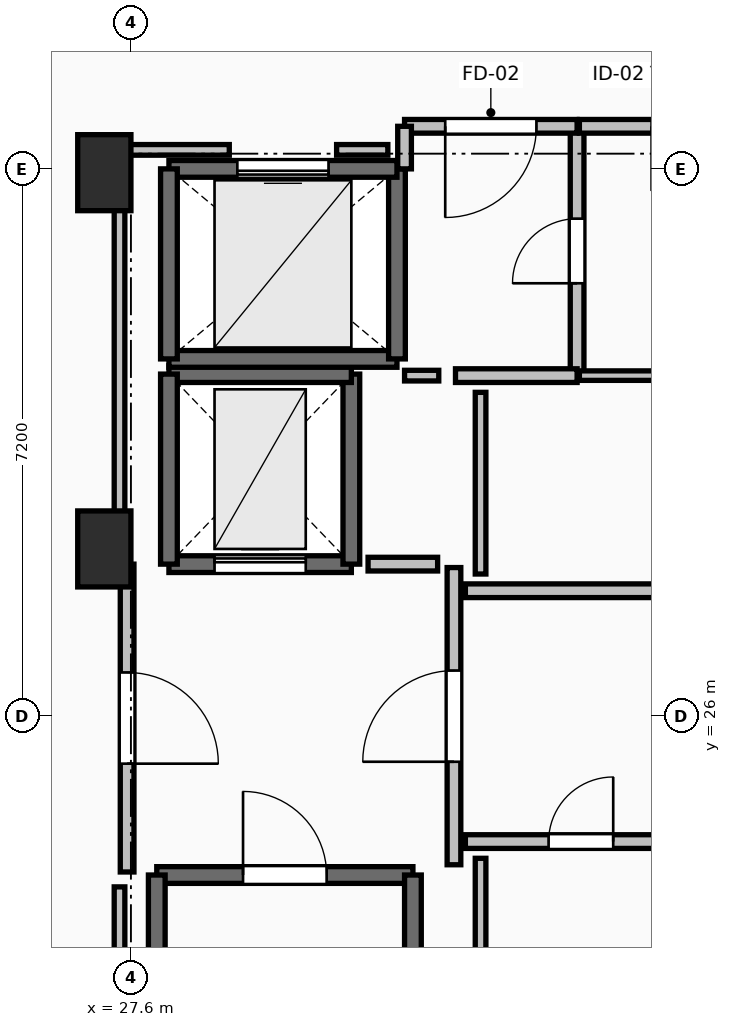
"""IFC4 building model, lengths in metres.
Left out: names, types, materials, properties, quantities, classifications, styles, units other than length and angle.
Written with IfcOpenShell. Run it as: python <this file> out.ifc"""

import sys

from ifc_helpers import new_model, si_unit, direction, frame, frame_2d, origin, origin_2d, place, context, subcontext, project, spatial, rectangle, extrude, element, fill, save


model = new_model("IFC4")
c1 = context("Model", 3, precision=1e-05, world=origin(), true_north=direction((0.0, 1.0)))
c2 = subcontext(c1, "Body", "Model", "MODEL_VIEW")
j1 = project(units=[si_unit("LENGTHUNIT", "METRE"), si_unit("PLANEANGLEUNIT", "RADIAN")], contexts=[c1])
p1 = place(None, origin())
s1 = spatial("IfcSite", under=j1, at=p1, CompositionType="ELEMENT")
p2 = place(p1, origin())
s2 = spatial("IfcBuilding", under=s1, at=p2, CompositionType="ELEMENT")
p3 = place(p2, frame((0.0, 0.0, 255.55)))
s3 = spatial("IfcBuildingStorey", under=s2, at=p3, CompositionType="ELEMENT", Elevation=255.55)
for number, where, z_axis, x_axis in (
    (1, (27.25, 28.2, 0.0), (0.0, 0.0, 1.0), (1.0, 0.0, 0.0)),
    (2, (27.25, 33.15, 0.0), (0.0, 0.0, 1.0), (1.0, 0.0, 0.0)),
):
    element("IfcColumn", number, at=place(p3, frame(where, z_axis=z_axis, x_axis=x_axis)), inside=s3, PredefinedType="PILASTER", context=c2, shape_type="SweptSolid", body=[
        extrude(rectangle(XDim=0.7, YDim=1.0, at=origin_2d()), origin(), (0.0, 0.0, 1.0), 3.55),
    ])
p4 = place(p3, frame((27.94, 23.91, 0.0), z_axis=(0.0, 0.0, 1.0), x_axis=(1.0, 0.0, 0.0)))
e3 = element("IfcWall", 3, at=p4, inside=s3, PredefinedType="SOLIDWALL", context=c2, shape_type="SweptSolid", body=[
    extrude(rectangle(XDim=3.37, YDim=0.22, at=frame_2d((1.685, 0.0))), origin(), (0.0, 0.0, 1.0), 3.29),
])
p5 = place(p4, frame((1.135, 0.0, 0.0)))
e4 = element("IfcOpeningElement", 4, at=p5, cuts=e3, PredefinedType="OPENING", context=c2, shape_type="SweptSolid", body=[
    extrude(rectangle(XDim=1.1, YDim=2.15, at=frame_2d((0.55, 1.075))), frame((0.0, 0.125, 0.0), z_axis=(0.0, -1.0, 0.0), x_axis=(1.0, 0.0, 0.0)), (0.0, 0.0, 1.0), 0.25),
])
for number, where, z_axis, x_axis in (
    (5, (31.31, 23.91, 0.0), (0.0, 0.0, 1.0), (0.0, -1.0, 0.0)),
    (6, (27.94, 16.49, 0.0), (0.0, 0.0, 1.0), (0.0, 1.0, 0.0)),
):
    element("IfcWall", number, at=place(p3, frame(where, z_axis=z_axis, x_axis=x_axis)), inside=s3, PredefinedType="SOLIDWALL", context=c2, shape_type="SweptSolid", body=[
        extrude(rectangle(XDim=7.42, YDim=0.22, at=frame_2d((3.71, 0.0))), origin(), (0.0, 0.0, 1.0), 3.29),
    ])
p6 = place(p3, frame((28.1, 28.0, 0.0), z_axis=(0.0, 0.0, 1.0), x_axis=(1.0, 0.0, 0.0)))
e7 = element("IfcWall", 7, at=p6, inside=s3, PredefinedType="SHEAR", context=c2, shape_type="SweptSolid", body=[
    extrude(rectangle(XDim=2.4, YDim=0.22, at=frame_2d((1.2, 0.0))), origin(), (0.0, 0.0, 1.0), 3.29),
])
p7 = place(p6, frame((0.6, 0.0, 0.0)))
e8 = element("IfcOpeningElement", 8, at=p7, cuts=e7, PredefinedType="OPENING", context=c2, shape_type="SweptSolid", body=[
    extrude(rectangle(XDim=1.2, YDim=2.2, at=frame_2d((0.6, 1.1))), frame((0.0, 0.125, 0.0), z_axis=(0.0, -1.0, 0.0), x_axis=(1.0, 0.0, 0.0)), (0.0, 0.0, 1.0), 0.25),
])
p8 = place(p3, frame((30.5, 28.0, 0.0), z_axis=(0.0, 0.0, 1.0), x_axis=(0.0, 1.0, 0.0)))
e9 = element("IfcWall", 9, at=p8, inside=s3, PredefinedType="SHEAR", context=c2, shape_type="SweptSolid", body=[
    extrude(rectangle(XDim=2.5, YDim=0.22, at=frame_2d((1.25, 0.0))), origin(), (0.0, 0.0, 1.0), 3.29),
])
p9 = place(p3, frame((30.5, 30.5, 0.0), z_axis=(0.0, 0.0, 1.0), x_axis=(-1.0, 0.0, 0.0)))
e10 = element("IfcWall", 10, at=p9, inside=s3, PredefinedType="SHEAR", context=c2, shape_type="SweptSolid", body=[
    extrude(rectangle(XDim=2.4, YDim=0.22, at=frame_2d((1.2, 0.0))), origin(), (0.0, 0.0, 1.0), 3.29),
])
p10 = place(p3, frame((28.1, 30.5, 0.0), z_axis=(0.0, 0.0, 1.0), x_axis=(0.0, -1.0, 0.0)))
e11 = element("IfcWall", 11, at=p10, inside=s3, PredefinedType="SHEAR", context=c2, shape_type="SweptSolid", body=[
    extrude(rectangle(XDim=2.5, YDim=0.22, at=frame_2d((1.25, 0.0))), origin(), (0.0, 0.0, 1.0), 3.29),
])
p11 = place(p3, frame((28.1, 30.7, 0.0), z_axis=(0.0, 0.0, 1.0), x_axis=(1.0, 0.0, 0.0)))
e12 = element("IfcWall", 12, at=p11, inside=s3, PredefinedType="SOLIDWALL", context=c2, shape_type="SweptSolid", body=[
    extrude(rectangle(XDim=3.0, YDim=0.22, at=frame_2d((1.5, 0.0))), origin(), (0.0, 0.0, 1.0), 3.29),
])
p12 = place(p3, frame((31.1, 30.7, 0.0), z_axis=(0.0, 0.0, 1.0), x_axis=(0.0, 1.0, 0.0)))
e13 = element("IfcWall", 13, at=p12, inside=s3, PredefinedType="SOLIDWALL", context=c2, shape_type="SweptSolid", body=[
    extrude(rectangle(XDim=2.5, YDim=0.22, at=frame_2d((1.25, 0.0))), origin(), (0.0, 0.0, 1.0), 3.29),
])
p13 = place(p3, frame((31.1, 33.2, 0.0), z_axis=(0.0, 0.0, 1.0), x_axis=(-1.0, 0.0, 0.0)))
e14 = element("IfcWall", 14, at=p13, inside=s3, PredefinedType="SOLIDWALL", context=c2, shape_type="SweptSolid", body=[
    extrude(rectangle(XDim=3.0, YDim=0.22, at=frame_2d((1.5, 0.0))), origin(), (0.0, 0.0, 1.0), 3.29),
])
p14 = place(p13, frame((0.9, 0.0, 0.0)))
e15 = element("IfcOpeningElement", 15, at=p14, cuts=e14, PredefinedType="OPENING", context=c2, shape_type="SweptSolid", body=[
    extrude(rectangle(XDim=1.2, YDim=2.2, at=frame_2d((0.6, 1.1))), frame((0.0, 0.125, 0.0), z_axis=(0.0, -1.0, 0.0), x_axis=(1.0, 0.0, 0.0)), (0.0, 0.0, 1.0), 0.25),
])
p15 = place(p3, frame((28.1, 33.2, 0.0), z_axis=(0.0, 0.0, 1.0), x_axis=(0.0, -1.0, 0.0)))
e16 = element("IfcWall", 16, at=p15, inside=s3, PredefinedType="SOLIDWALL", context=c2, shape_type="SweptSolid", body=[
    extrude(rectangle(XDim=2.5, YDim=0.22, at=frame_2d((1.25, 0.0))), origin(), (0.0, 0.0, 1.0), 3.29),
])
p16 = place(p3, frame((31.85, 24.045, 0.0), z_axis=(0.0, 0.0, 1.0), x_axis=(0.0, 1.0, 0.0)))
e17 = element("IfcWall", 17, at=p16, inside=s3, PredefinedType="PARTITIONING", context=c2, shape_type="SweptSolid", body=[
    extrude(rectangle(XDim=3.91, YDim=0.18, at=frame_2d((1.955, 0.0))), origin(), (0.0, 0.0, 1.0), 3.29),
])
p17 = place(p16, frame((1.355, 0.0, 0.0)))
e18 = element("IfcOpeningElement", 18, at=p17, cuts=e17, PredefinedType="OPENING", context=c2, shape_type="SweptSolid", body=[
    extrude(rectangle(XDim=1.2, YDim=2.15, at=frame_2d((0.6, 1.075))), frame((0.0, 0.105, 0.0), z_axis=(0.0, -1.0, 0.0), x_axis=(1.0, 0.0, 0.0)), (0.0, 0.0, 1.0), 0.21),
])
p18 = place(p3, frame((27.55, 28.0, 0.0), z_axis=(0.0, 0.0, 1.0), x_axis=(0.0, -1.0, 0.0)))
e19 = element("IfcWall", 19, at=p18, inside=s3, PredefinedType="PARTITIONING", context=c2, shape_type="SweptSolid", body=[
    extrude(rectangle(XDim=4.05, YDim=0.18, at=frame_2d((2.025, 0.0))), origin(), (0.0, 0.0, 1.0), 3.29),
])
p19 = place(p18, frame((1.425, 0.0, 0.0)))
e20 = element("IfcOpeningElement", 20, at=p19, cuts=e19, PredefinedType="OPENING", context=c2, shape_type="SweptSolid", body=[
    extrude(rectangle(XDim=1.2, YDim=2.15, at=frame_2d((0.6, 1.075))), frame((0.0, 0.105, 0.0), z_axis=(0.0, -1.0, 0.0), x_axis=(1.0, 0.0, 0.0)), (0.0, 0.0, 1.0), 0.21),
])
p20 = place(p3, frame((33.47, 30.48, 0.0), z_axis=(0.0, 0.0, 1.0), x_axis=(0.0, 1.0, 0.0)))
e21 = element("IfcWall", 21, at=p20, inside=s3, PredefinedType="PARTITIONING", context=c2, shape_type="SweptSolid", body=[
    extrude(rectangle(XDim=3.28, YDim=0.18, at=frame_2d((1.64, 0.0))), origin(), (0.0, 0.0, 1.0), 3.29),
])
p21 = place(p20, frame((1.215, 0.0, 0.0)))
e22 = element("IfcOpeningElement", 22, at=p21, cuts=e21, PredefinedType="OPENING", context=c2, shape_type="SweptSolid", body=[
    extrude(rectangle(XDim=0.85, YDim=2.1, at=frame_2d((0.425, 1.05))), frame((0.0, 0.105, 0.0), z_axis=(0.0, -1.0, 0.0), x_axis=(1.0, 0.0, 0.0)), (0.0, 0.0, 1.0), 0.21),
])
p22 = place(p3, frame((31.87, 30.48, 0.0), z_axis=(0.0, 0.0, 1.0), x_axis=(1.0, 0.0, 0.0)))
e23 = element("IfcWall", 23, at=p22, inside=s3, PredefinedType="PARTITIONING", context=c2, shape_type="SweptSolid", body=[
    extrude(rectangle(XDim=1.6, YDim=0.18, at=frame_2d((0.8, 0.0))), origin(), (0.0, 0.0, 1.0), 3.29),
])
p23 = place(p3, frame((33.47, 33.76, 0.0), z_axis=(0.0, 0.0, 1.0), x_axis=(-1.0, 0.0, 0.0)))
e24 = element("IfcWall", 24, at=p23, inside=s3, PredefinedType="PARTITIONING", context=c2, shape_type="SweptSolid", body=[
    extrude(rectangle(XDim=2.27, YDim=0.18, at=frame_2d((1.135, 0.0))), origin(), (0.0, 0.0, 1.0), 3.29),
])
p24 = place(p23, frame((0.535, 0.0, 0.0)))
e25 = element("IfcOpeningElement", 25, at=p24, cuts=e24, PredefinedType="OPENING", context=c2, shape_type="SweptSolid", body=[
    extrude(rectangle(XDim=1.2, YDim=2.15, at=frame_2d((0.6, 1.075))), frame((0.0, 0.105, 0.0), z_axis=(0.0, -1.0, 0.0), x_axis=(1.0, 0.0, 0.0)), (0.0, 0.0, 1.0), 0.21),
])
p25 = place(p3, frame((31.2, 33.76, 0.0), z_axis=(0.0, 0.0, 1.0), x_axis=(0.0, -1.0, 0.0)))
e26 = element("IfcWall", 26, at=p25, inside=s3, PredefinedType="PARTITIONING", context=c2, shape_type="SweptSolid", body=[
    extrude(rectangle(XDim=0.56, YDim=0.18, at=frame_2d((0.28, 0.0))), origin(), (0.0, 0.0, 1.0), 3.29),
])
p26 = place(p3, frame((39.19, 27.65, 0.0), z_axis=(0.0, 0.0, 1.0), x_axis=(-1.0, 0.0, 0.0)))
e27 = element("IfcWall", 27, at=p26, inside=s3, PredefinedType="PARTITIONING", context=c2, shape_type="SweptSolid", body=[
    extrude(rectangle(XDim=7.19, YDim=0.18, at=frame_2d((3.595, 0.0))), origin(), (0.0, 0.0, 1.0), 3.29),
])
p27 = place(p26, frame((3.095, 0.0, 0.0)))
e28 = element("IfcOpeningElement", 28, at=p27, cuts=e27, PredefinedType="OPENING", context=c2, shape_type="SweptSolid", body=[
    extrude(rectangle(XDim=1.0, YDim=2.15, at=frame_2d((0.5, 1.075))), frame((0.0, 0.105, 0.0), z_axis=(0.0, -1.0, 0.0), x_axis=(1.0, 0.0, 0.0)), (0.0, 0.0, 1.0), 0.21),
])
p28 = place(p3, frame((32.0, 24.35, 0.0), z_axis=(0.0, 0.0, 1.0), x_axis=(1.0, 0.0, 0.0)))
e29 = element("IfcWall", 29, at=p28, inside=s3, PredefinedType="PARTITIONING", context=c2, shape_type="SweptSolid", body=[
    extrude(rectangle(XDim=3.04, YDim=0.18, at=frame_2d((1.52, 0.0))), origin(), (0.0, 0.0, 1.0), 3.29),
])
p29 = place(p28, frame((1.095, 0.0, 0.0)))
e30 = element("IfcOpeningElement", 30, at=p29, cuts=e29, PredefinedType="OPENING", context=c2, shape_type="SweptSolid", body=[
    extrude(rectangle(XDim=0.85, YDim=2.1, at=frame_2d((0.425, 1.05))), frame((0.0, 0.105, 0.0), z_axis=(0.0, -1.0, 0.0), x_axis=(1.0, 0.0, 0.0)), (0.0, 0.0, 1.0), 0.21),
])
p30 = place(p3, frame((33.5, 30.48, 0.0), z_axis=(0.0, 0.0, 1.0), x_axis=(1.0, 0.0, 0.0)))
e31 = element("IfcWall", 31, at=p30, inside=s3, PredefinedType="PARTITIONING", context=c2, shape_type="SweptSolid", body=[
    extrude(rectangle(XDim=2.75, YDim=0.125, at=frame_2d((1.375, 0.0))), origin(), (0.0, 0.0, 1.0), 2.482),
])
p31 = place(p3, frame((36.25, 33.76, 0.0), z_axis=(0.0, 0.0, 1.0), x_axis=(-1.0, 0.0, 0.0)))
e32 = element("IfcWall", 32, at=p31, inside=s3, PredefinedType="PARTITIONING", context=c2, shape_type="SweptSolid", body=[
    extrude(rectangle(XDim=2.75, YDim=0.18, at=frame_2d((1.375, 0.0))), origin(), (0.0, 0.0, 1.0), 3.29),
])
p32 = place(p31, frame((0.95, 0.0, 0.0)))
e33 = element("IfcOpeningElement", 33, at=p32, cuts=e32, PredefinedType="OPENING", context=c2, shape_type="SweptSolid", body=[
    extrude(rectangle(XDim=0.85, YDim=2.1, at=frame_2d((0.425, 1.05))), frame((0.0, 0.105, 0.0), z_axis=(0.0, -1.0, 0.0), x_axis=(1.0, 0.0, 0.0)), (0.0, 0.0, 1.0), 0.21),
])
p33 = place(p3, frame((31.635, 28.0, 0.0), z_axis=(0.0, 0.0, 1.0), x_axis=(-1.0, 0.0, 0.0)))
e34 = element("IfcWall", 34, at=p33, inside=s3, PredefinedType="PARTITIONING", context=c2, shape_type="SweptSolid", body=[
    extrude(rectangle(XDim=0.915, YDim=0.18, at=frame_2d((0.458, 0.0))), origin(), (0.0, 0.0, 1.0), 3.29),
])
p34 = place(p3, frame((31.2, 30.48, 0.0), z_axis=(0.0, 0.0, 1.0), x_axis=(1.0, 0.0, 0.0)))
e35 = element("IfcWall", 35, at=p34, inside=s3, PredefinedType="PARTITIONING", context=c2, shape_type="SweptSolid", body=[
    extrude(rectangle(XDim=0.45, YDim=0.14, at=frame_2d((0.225, 0.0))), origin(), (0.0, 0.0, 1.0), 3.29),
])
p35 = place(p3, frame((32.2, 30.26, 0.0), z_axis=(0.0, 0.0, 1.0), x_axis=(0.0, -1.0, 0.0)))
e36 = element("IfcWall", 36, at=p35, inside=s3, PredefinedType="PARTITIONING", context=c2, shape_type="SweptSolid", body=[
    extrude(rectangle(XDim=2.39, YDim=0.14, at=frame_2d((1.195, 0.0))), origin(), (0.0, 0.0, 1.0), 3.29),
])
p36 = place(p3, frame((32.2, 24.13, 0.0), z_axis=(0.0, 0.0, 1.0), x_axis=(0.0, -1.0, 0.0)))
e37 = element("IfcWall", 37, at=p36, inside=s3, PredefinedType="PARTITIONING", context=c2, shape_type="SweptSolid", body=[
    extrude(rectangle(XDim=2.46, YDim=0.14, at=frame_2d((1.23, 0.0))), origin(), (0.0, 0.0, 1.0), 2.482),
])
p37 = place(p3, frame((30.98, 33.45, 0.0), z_axis=(0.0, 0.0, 1.0), x_axis=(-1.0, 0.0, 0.0)))
e38 = element("IfcWall", 38, at=p37, inside=s3, PredefinedType="PARTITIONING", context=c2, shape_type="SweptSolid", body=[
    extrude(rectangle(XDim=0.674, YDim=0.14, at=frame_2d((0.337, 0.0))), origin(), (0.0, 0.0, 1.0), 3.29),
])
p38 = place(p3, frame((28.894, 33.45, 0.0), z_axis=(0.0, 0.0, 1.0), x_axis=(-1.0, 0.0, 0.0)))
e39 = element("IfcWall", 39, at=p38, inside=s3, PredefinedType="PARTITIONING", context=c2, shape_type="SweptSolid", body=[
    extrude(rectangle(XDim=1.444, YDim=0.14, at=frame_2d((0.722, 0.0))), origin(), (0.0, 0.0, 1.0), 2.482),
])
p39 = place(p3, frame((27.45, 33.45, 0.0), z_axis=(0.0, 0.0, 1.0), x_axis=(0.0, -1.0, 0.0)))
e40 = element("IfcWall", 40, at=p39, inside=s3, PredefinedType="PARTITIONING", context=c2, shape_type="SweptSolid", body=[
    extrude(rectangle(XDim=5.254, YDim=0.14, at=frame_2d((2.627, 0.0))), origin(), (0.0, 0.0, 1.0), 2.482),
])
p40 = place(p3, frame((27.45, 23.754, 0.0), z_axis=(0.0, 0.0, 1.0), x_axis=(0.0, -1.0, 0.0)))
e41 = element("IfcWall", 41, at=p40, inside=s3, PredefinedType="PARTITIONING", context=c2, shape_type="SweptSolid", body=[
    extrude(rectangle(XDim=7.514, YDim=0.14, at=frame_2d((3.757, 0.0))), origin(), (0.0, 0.0, 1.0), 2.482),
])
p41 = place(p5, origin())
e42 = element("IfcDoor", 42, at=p41, inside=s3, OperationType="SINGLE_SWING_LEFT", PredefinedType="DOOR", context=c2, shape_type="SweptSolid", body=[
    extrude(rectangle(XDim=1.1, YDim=2.15, at=frame_2d((0.55, 1.075))), frame((0.0, 0.025, 0.0), z_axis=(0.0, -1.0, 0.0), x_axis=(1.0, 0.0, 0.0)), (0.0, 0.0, 1.0), 0.05),
])
fill(e4, e42)
p42 = place(p7, origin())
e43 = element("IfcDoor", 43, at=p42, inside=s3, OperationType="SLIDING_TO_LEFT", PredefinedType="DOOR", context=c2, shape_type="SweptSolid", body=[
    extrude(rectangle(XDim=1.2, YDim=2.2, at=frame_2d((0.6, 1.1))), frame((0.0, 0.025, 0.0), z_axis=(0.0, -1.0, 0.0), x_axis=(1.0, 0.0, 0.0)), (0.0, 0.0, 1.0), 0.05),
])
fill(e8, e43)
p43 = place(p14, origin())
e44 = element("IfcDoor", 44, at=p43, inside=s3, OperationType="SLIDING_TO_LEFT", PredefinedType="DOOR", context=c2, shape_type="SweptSolid", body=[
    extrude(rectangle(XDim=1.2, YDim=2.2, at=frame_2d((0.6, 1.1))), frame((0.0, 0.025, 0.0), z_axis=(0.0, -1.0, 0.0), x_axis=(1.0, 0.0, 0.0)), (0.0, 0.0, 1.0), 0.05),
])
fill(e15, e44)
p44 = place(p17, origin())
e45 = element("IfcDoor", 45, at=p44, inside=s3, OperationType="SINGLE_SWING_LEFT", PredefinedType="DOOR", context=c2, shape_type="SweptSolid", body=[
    extrude(rectangle(XDim=1.2, YDim=2.15, at=frame_2d((0.6, 1.075))), frame((0.0, 0.025, 0.0), z_axis=(0.0, -1.0, 0.0), x_axis=(1.0, 0.0, 0.0)), (0.0, 0.0, 1.0), 0.05),
])
fill(e18, e45)
p45 = place(p19, origin())
e46 = element("IfcDoor", 46, at=p45, inside=s3, OperationType="SINGLE_SWING_RIGHT", PredefinedType="DOOR", context=c2, shape_type="SweptSolid", body=[
    extrude(rectangle(XDim=1.2, YDim=2.15, at=frame_2d((0.6, 1.075))), frame((0.0, 0.025, 0.0), z_axis=(0.0, -1.0, 0.0), x_axis=(1.0, 0.0, 0.0)), (0.0, 0.0, 1.0), 0.05),
])
fill(e20, e46)
p46 = place(p21, origin())
e47 = element("IfcDoor", 47, at=p46, inside=s3, OperationType="SINGLE_SWING_LEFT", PredefinedType="DOOR", context=c2, shape_type="SweptSolid", body=[
    extrude(rectangle(XDim=0.85, YDim=2.1, at=frame_2d((0.425, 1.05))), frame((0.0, 0.025, 0.0), z_axis=(0.0, -1.0, 0.0), x_axis=(1.0, 0.0, 0.0)), (0.0, 0.0, 1.0), 0.05),
])
fill(e22, e47)
p47 = place(p24, origin())
e48 = element("IfcDoor", 48, at=p47, inside=s3, OperationType="SINGLE_SWING_RIGHT", PredefinedType="DOOR", context=c2, shape_type="SweptSolid", body=[
    extrude(rectangle(XDim=1.2, YDim=2.15, at=frame_2d((0.6, 1.075))), frame((0.0, 0.025, 0.0), z_axis=(0.0, -1.0, 0.0), x_axis=(1.0, 0.0, 0.0)), (0.0, 0.0, 1.0), 0.05),
])
fill(e25, e48)
p48 = place(p29, origin())
e49 = element("IfcDoor", 49, at=p48, inside=s3, OperationType="SINGLE_SWING_RIGHT", PredefinedType="DOOR", context=c2, shape_type="SweptSolid", body=[
    extrude(rectangle(XDim=0.85, YDim=2.1, at=frame_2d((0.425, 1.05))), frame((0.0, 0.025, 0.0), z_axis=(0.0, -1.0, 0.0), x_axis=(1.0, 0.0, 0.0)), (0.0, 0.0, 1.0), 0.05),
])
fill(e30, e49)
save(model, sys.argv[1])
